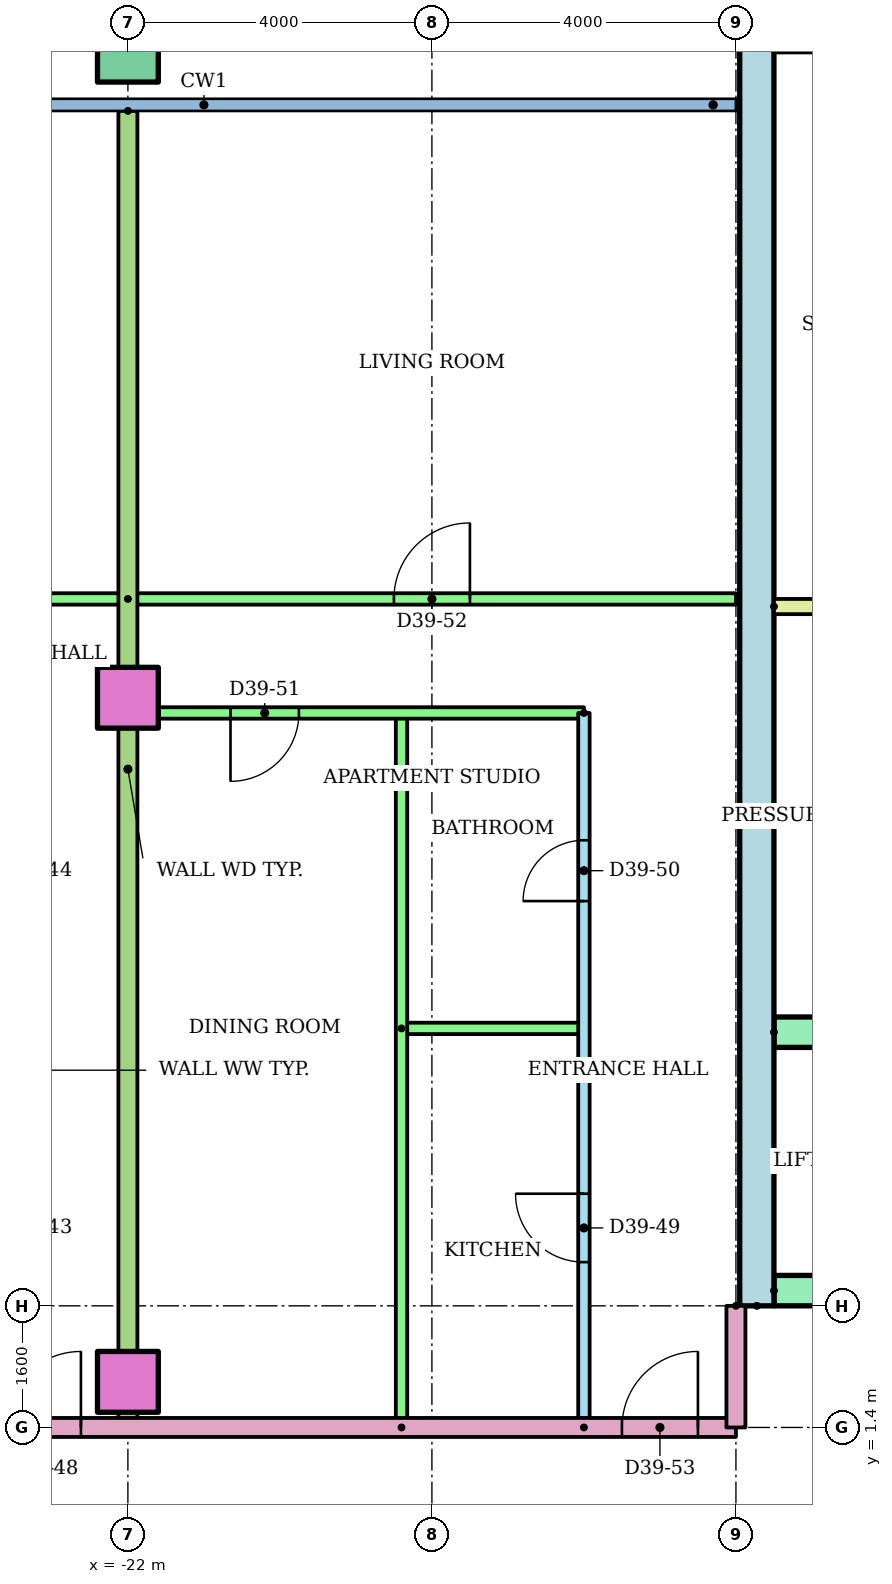
"""IFC4 building model, lengths in metres.
Left out: names, types, materials, properties, quantities, classifications, styles, units other than length and angle.
Written with IfcOpenShell. Run it as: python <this file> out.ifc"""

import sys

from ifc_helpers import new_model, si_unit, direction, frame, frame_2d, origin, origin_2d, place, context, subcontext, project, spatial, rectangle, hollow_rectangle, extrude, element, fill, save


model = new_model("IFC4")
c1 = context("Model", 3, precision=1e-05, world=origin(), true_north=direction((0.0, 1.0)))
c2 = subcontext(c1, "Body", "Model", "MODEL_VIEW")
j1 = project(units=[si_unit("LENGTHUNIT", "METRE"), si_unit("PLANEANGLEUNIT", "RADIAN")], contexts=[c1])
p1 = place(None, origin())
s1 = spatial("IfcSite", under=j1, at=p1, CompositionType="ELEMENT")
p2 = place(p1, origin())
s2 = spatial("IfcBuilding", under=s1, at=p2, CompositionType="ELEMENT")
p3 = place(p2, frame((0.0, 0.0, 148.6)))
s3 = spatial("IfcBuildingStorey", under=s2, at=p3, CompositionType="ELEMENT", Elevation=148.6)
for number, where in (
    (1, (-22.0, 2.0, 0.0)),
    (2, (-22.0, 11.0, 0.0)),
):
    element("IfcColumn", number, at=place(p3, frame(where)), inside=s3, PredefinedType="COLUMN", context=c2, shape_type="SweptSolid", body=[
        extrude(rectangle(XDim=0.8, YDim=0.8, at=origin_2d()), origin(), (0.0, 0.0, 1.0), 3.2),
    ])
p4 = place(p3, frame((-22.0, 19.5, 0.0)))
e3 = element("IfcColumn", 3, at=p4, inside=s3, PredefinedType="COLUMN", context=c2, shape_type="SweptSolid", body=[
    extrude(hollow_rectangle(XDim=0.8, YDim=0.8, WallThickness=0.04, at=origin_2d()), origin(), (0.0, 0.0, 1.0), 3.2),
])
p5 = place(p3, frame((-13.725, 3.0, 0.0), z_axis=(0.0, 0.0, 1.0), x_axis=(0.0, 1.0, 0.0)))
e4 = element("IfcWall", 4, at=p5, inside=s3, PredefinedType="SHEAR", context=c2, shape_type="SweptSolid", body=[
    extrude(rectangle(XDim=17.0, YDim=0.45, at=frame_2d((8.5, 0.0))), origin(), (0.0, 0.0, 1.0), 2.8),
])
p6 = place(p3, frame((-13.5, 3.2, 0.0)))
e5 = element("IfcWall", 5, at=p6, inside=s3, PredefinedType="SHEAR", context=c2, shape_type="SweptSolid", body=[
    extrude(rectangle(XDim=27.0, YDim=0.4, at=frame_2d((13.5, 0.0))), origin(), (0.0, 0.0, 1.0), 2.8),
])
p7 = place(p6, frame((6.861, 0.0, 0.0)))
e6 = element("IfcOpeningElement", 6, at=p7, cuts=e5, PredefinedType="OPENING", context=c2, shape_type="SweptSolid", body=[
    extrude(rectangle(XDim=1.1, YDim=2.1, at=frame_2d((0.55, 1.05))), frame((0.0, 0.21, 0.0), z_axis=(0.0, -1.0, 0.0), x_axis=(1.0, 0.0, 0.0)), (0.0, 0.0, 1.0), 0.42),
])
p8 = place(p6, frame((9.906, 0.0, 0.0)))
e7 = element("IfcOpeningElement", 7, at=p8, cuts=e5, PredefinedType="OPENING", context=c2, shape_type="SweptSolid", body=[
    extrude(rectangle(XDim=1.1, YDim=2.1, at=frame_2d((0.55, 1.05))), frame((0.0, 0.21, 0.0), z_axis=(0.0, -1.0, 0.0), x_axis=(1.0, 0.0, 0.0)), (0.0, 0.0, 1.0), 0.42),
])
p9 = place(p6, frame((15.994, 0.0, 0.0)))
e8 = element("IfcOpeningElement", 8, at=p9, cuts=e5, PredefinedType="OPENING", context=c2, shape_type="SweptSolid", body=[
    extrude(rectangle(XDim=1.1, YDim=2.1, at=frame_2d((0.55, 1.05))), frame((0.0, 0.21, 0.0), z_axis=(0.0, -1.0, 0.0), x_axis=(1.0, 0.0, 0.0)), (0.0, 0.0, 1.0), 0.42),
])
p10 = place(p6, frame((19.039, 0.0, 0.0)))
e9 = element("IfcOpeningElement", 9, at=p10, cuts=e5, PredefinedType="OPENING", context=c2, shape_type="SweptSolid", body=[
    extrude(rectangle(XDim=1.1, YDim=2.1, at=frame_2d((0.55, 1.05))), frame((0.0, 0.21, 0.0), z_axis=(0.0, -1.0, 0.0), x_axis=(1.0, 0.0, 0.0)), (0.0, 0.0, 1.0), 0.42),
])
p11 = place(p6, frame((12.6, 0.0, 0.0)))
e10 = element("IfcOpeningElement", 10, at=p11, cuts=e5, PredefinedType="OPENING", context=c2, shape_type="SweptSolid", body=[
    extrude(rectangle(XDim=1.8, YDim=2.1, at=frame_2d((0.9, 1.05))), frame((0.0, 0.21, 0.0), z_axis=(0.0, -1.0, 0.0), x_axis=(1.0, 0.0, 0.0)), (0.0, 0.0, 1.0), 0.42),
])
p12 = place(p3, frame((-13.5, 6.6, 0.0)))
e11 = element("IfcWall", 11, at=p12, inside=s3, PredefinedType="SHEAR", context=c2, shape_type="SweptSolid", body=[
    extrude(rectangle(XDim=11.978, YDim=0.4, at=frame_2d((5.989, 0.0))), origin(), (0.0, 0.0, 1.0), 2.8),
])
p13 = place(p3, frame((-13.5, 12.2, 0.0)))
e12 = element("IfcWall", 12, at=p13, inside=s3, PredefinedType="PARTITIONING", context=c2, shape_type="SweptSolid", body=[
    extrude(rectangle(XDim=3.9, YDim=0.2, at=frame_2d((1.95, 0.0))), origin(), (0.0, 0.0, 1.0), 2.8),
])
p14 = place(p3, frame((-32.72, 12.3, 0.0)))
e13 = element("IfcWall", 13, at=p14, inside=s3, PredefinedType="PARTITIONING", context=c2, shape_type="SweptSolid", body=[
    extrude(rectangle(XDim=10.72, YDim=0.15, at=frame_2d((5.36, 0.0))), origin(), (0.0, 0.0, 1.0), 2.4),
])
p15 = place(p14, frame((1.102, 0.0, 0.0)))
e14 = element("IfcOpeningElement", 14, at=p15, cuts=e13, PredefinedType="OPENING", context=c2, shape_type="SweptSolid", body=[
    extrude(rectangle(XDim=1.0, YDim=2.1, at=frame_2d((0.5, 1.05))), frame((0.0, 0.085, 0.0), z_axis=(0.0, -1.0, 0.0), x_axis=(1.0, 0.0, 0.0)), (0.0, 0.0, 1.0), 0.17),
])
p16 = place(p14, frame((7.22, 0.0, 0.0)))
e15 = element("IfcOpeningElement", 15, at=p16, cuts=e13, PredefinedType="OPENING", context=c2, shape_type="SweptSolid", body=[
    extrude(rectangle(XDim=1.0, YDim=2.1, at=frame_2d((0.5, 1.05))), frame((0.0, 0.085, 0.0), z_axis=(0.0, -1.0, 0.0), x_axis=(1.0, 0.0, 0.0)), (0.0, 0.0, 1.0), 0.17),
])
p17 = place(p3, frame((-16.0, 1.4, 0.0), z_axis=(0.0, 0.0, 1.0), x_axis=(0.0, 1.0, 0.0)))
e16 = element("IfcWall", 16, at=p17, inside=s3, PredefinedType="PARTITIONING", context=c2, shape_type="SweptSolid", body=[
    extrude(rectangle(XDim=9.4, YDim=0.15, at=frame_2d((4.7, 0.0))), origin(), (0.0, 0.0, 1.0), 2.4),
])
p18 = place(p17, frame((2.175, 0.0, 0.0)))
e17 = element("IfcOpeningElement", 17, at=p18, cuts=e16, PredefinedType="OPENING", context=c2, shape_type="SweptSolid", body=[
    extrude(rectangle(XDim=0.9, YDim=2.1, at=frame_2d((0.45, 1.05))), frame((0.0, 0.085, 0.0), z_axis=(0.0, -1.0, 0.0), x_axis=(1.0, 0.0, 0.0)), (0.0, 0.0, 1.0), 0.17),
])
p19 = place(p17, frame((6.925, 0.0, 0.0)))
e18 = element("IfcOpeningElement", 18, at=p19, cuts=e16, PredefinedType="OPENING", context=c2, shape_type="SweptSolid", body=[
    extrude(rectangle(XDim=0.8, YDim=2.1, at=frame_2d((0.4, 1.05))), frame((0.0, 0.085, 0.0), z_axis=(0.0, -1.0, 0.0), x_axis=(1.0, 0.0, 0.0)), (0.0, 0.0, 1.0), 0.17),
])
p20 = place(p3, frame((-18.4, 6.65, 0.0)))
e19 = element("IfcWall", 19, at=p20, inside=s3, PredefinedType="PARTITIONING", context=c2, shape_type="SweptSolid", body=[
    extrude(rectangle(XDim=2.4, YDim=0.15, at=frame_2d((1.2, 0.0))), origin(), (0.0, 0.0, 1.0), 2.4),
])
p21 = place(p3, frame((-18.4, 1.4, 0.0), z_axis=(0.0, 0.0, 1.0), x_axis=(0.0, 1.0, 0.0)))
e20 = element("IfcWall", 20, at=p21, inside=s3, PredefinedType="PARTITIONING", context=c2, shape_type="SweptSolid", body=[
    extrude(rectangle(XDim=9.4, YDim=0.15, at=frame_2d((4.7, 0.0))), origin(), (0.0, 0.0, 1.0), 2.4),
])
p22 = place(p3, frame((-16.0, 10.8, 0.0), z_axis=(0.0, 0.0, 1.0), x_axis=(-1.0, 0.0, 0.0)))
e21 = element("IfcWall", 21, at=p22, inside=s3, PredefinedType="PARTITIONING", context=c2, shape_type="SweptSolid", body=[
    extrude(rectangle(XDim=6.0, YDim=0.15, at=frame_2d((3.0, 0.0))), origin(), (0.0, 0.0, 1.0), 2.4),
])
p23 = place(p22, frame((3.75, 0.0, 0.0)))
e22 = element("IfcOpeningElement", 22, at=p23, cuts=e21, PredefinedType="OPENING", context=c2, shape_type="SweptSolid", body=[
    extrude(rectangle(XDim=0.9, YDim=2.1, at=frame_2d((0.45, 1.05))), frame((0.0, 0.085, 0.0), z_axis=(0.0, -1.0, 0.0), x_axis=(1.0, 0.0, 0.0)), (0.0, 0.0, 1.0), 0.17),
])
p24 = place(p3, frame((-22.0, 12.3, 0.0)))
e23 = element("IfcWall", 23, at=p24, inside=s3, PredefinedType="PARTITIONING", context=c2, shape_type="SweptSolid", body=[
    extrude(rectangle(XDim=8.0, YDim=0.15, at=frame_2d((4.0, 0.0))), origin(), (0.0, 0.0, 1.0), 2.4),
])
p25 = place(p24, frame((3.5, 0.0, 0.0)))
e24 = element("IfcOpeningElement", 24, at=p25, cuts=e23, PredefinedType="OPENING", context=c2, shape_type="SweptSolid", body=[
    extrude(rectangle(XDim=1.0, YDim=2.1, at=frame_2d((0.5, 1.05))), frame((0.0, 0.085, 0.0), z_axis=(0.0, -1.0, 0.0), x_axis=(1.0, 0.0, 0.0)), (0.0, 0.0, 1.0), 0.17),
])
p26 = place(p3, frame((-22.0, 18.721, 0.0), z_axis=(0.0, 0.0, 1.0), x_axis=(0.0, -1.0, 0.0)))
e25 = element("IfcWall", 25, at=p26, inside=s3, PredefinedType="PARTITIONING", context=c2, shape_type="SweptSolid", body=[
    extrude(rectangle(XDim=17.321, YDim=0.25, at=frame_2d((8.661, 0.0))), origin(), (0.0, 0.0, 1.0), 2.4),
])
p27 = place(p3, frame((-29.0, 1.4, 0.0)))
e26 = element("IfcWall", 26, at=p27, inside=s3, PredefinedType="PARTITIONING", context=c2, shape_type="SweptSolid", body=[
    extrude(rectangle(XDim=15.0, YDim=0.25, at=frame_2d((7.5, 0.0))), origin(), (0.0, 0.0, 1.0), 2.4),
])
p28 = place(p27, frame((5.382, 0.0, 0.0)))
e27 = element("IfcOpeningElement", 27, at=p28, cuts=e26, PredefinedType="OPENING", context=c2, shape_type="SweptSolid", body=[
    extrude(rectangle(XDim=1.0, YDim=2.1, at=frame_2d((0.5, 1.05))), frame((0.0, 0.135, 0.0), z_axis=(0.0, -1.0, 0.0), x_axis=(1.0, 0.0, 0.0)), (0.0, 0.0, 1.0), 0.27),
])
p29 = place(p27, frame((13.5, 0.0, 0.0)))
e28 = element("IfcOpeningElement", 28, at=p29, cuts=e26, PredefinedType="OPENING", context=c2, shape_type="SweptSolid", body=[
    extrude(rectangle(XDim=1.0, YDim=2.1, at=frame_2d((0.5, 1.05))), frame((0.0, 0.135, 0.0), z_axis=(0.0, -1.0, 0.0), x_axis=(1.0, 0.0, 0.0)), (0.0, 0.0, 1.0), 0.27),
])
p30 = place(p3, frame((-14.0, 3.0, 0.0), z_axis=(0.0, 0.0, 1.0), x_axis=(0.0, -1.0, 0.0)))
e29 = element("IfcWall", 29, at=p30, inside=s3, PredefinedType="PARTITIONING", context=c2, shape_type="SweptSolid", body=[
    extrude(rectangle(XDim=1.6, YDim=0.25, at=frame_2d((0.8, 0.0))), origin(), (0.0, 0.0, 1.0), 2.4),
])
p31 = place(p28, origin())
e30 = element("IfcDoor", 30, at=p31, inside=s3, OperationType="SINGLE_SWING_RIGHT", PredefinedType="DOOR", context=c2, shape_type="SweptSolid", body=[
    extrude(rectangle(XDim=1.0, YDim=2.1, at=frame_2d((0.5, 1.05))), frame((0.0, 0.025, 0.0), z_axis=(0.0, -1.0, 0.0), x_axis=(1.0, 0.0, 0.0)), (0.0, 0.0, 1.0), 0.05),
])
fill(e27, e30)
p32 = place(p18, origin())
e31 = element("IfcDoor", 31, at=p32, inside=s3, OperationType="SINGLE_SWING_RIGHT", PredefinedType="DOOR", context=c2, shape_type="SweptSolid", body=[
    extrude(rectangle(XDim=0.9, YDim=2.1, at=frame_2d((0.45, 1.05))), frame((0.0, 0.025, 0.0), z_axis=(0.0, -1.0, 0.0), x_axis=(1.0, 0.0, 0.0)), (0.0, 0.0, 1.0), 0.05),
])
fill(e17, e31)
p33 = place(p19, origin())
e32 = element("IfcDoor", 32, at=p33, inside=s3, OperationType="SINGLE_SWING_LEFT", PredefinedType="DOOR", context=c2, shape_type="SweptSolid", body=[
    extrude(rectangle(XDim=0.8, YDim=2.1, at=frame_2d((0.4, 1.05))), frame((0.0, 0.025, 0.0), z_axis=(0.0, -1.0, 0.0), x_axis=(1.0, 0.0, 0.0)), (0.0, 0.0, 1.0), 0.05),
])
fill(e18, e32)
p34 = place(p23, origin())
e33 = element("IfcDoor", 33, at=p34, inside=s3, OperationType="SINGLE_SWING_RIGHT", PredefinedType="DOOR", context=c2, shape_type="SweptSolid", body=[
    extrude(rectangle(XDim=0.9, YDim=2.1, at=frame_2d((0.45, 1.05))), frame((0.0, 0.025, 0.0), z_axis=(0.0, -1.0, 0.0), x_axis=(1.0, 0.0, 0.0)), (0.0, 0.0, 1.0), 0.05),
])
fill(e22, e33)
p35 = place(p25, origin())
e34 = element("IfcDoor", 34, at=p35, inside=s3, OperationType="SINGLE_SWING_RIGHT", PredefinedType="DOOR", context=c2, shape_type="SweptSolid", body=[
    extrude(rectangle(XDim=1.0, YDim=2.1, at=frame_2d((0.5, 1.05))), frame((0.0, 0.025, 0.0), z_axis=(0.0, -1.0, 0.0), x_axis=(1.0, 0.0, 0.0)), (0.0, 0.0, 1.0), 0.05),
])
fill(e24, e34)
p36 = place(p29, origin())
e35 = element("IfcDoor", 35, at=p36, inside=s3, OperationType="SINGLE_SWING_RIGHT", PredefinedType="DOOR", context=c2, shape_type="SweptSolid", body=[
    extrude(rectangle(XDim=1.0, YDim=2.1, at=frame_2d((0.5, 1.05))), frame((0.0, 0.025, 0.0), z_axis=(0.0, -1.0, 0.0), x_axis=(1.0, 0.0, 0.0)), (0.0, 0.0, 1.0), 0.05),
])
fill(e28, e35)
save(model, sys.argv[1])
